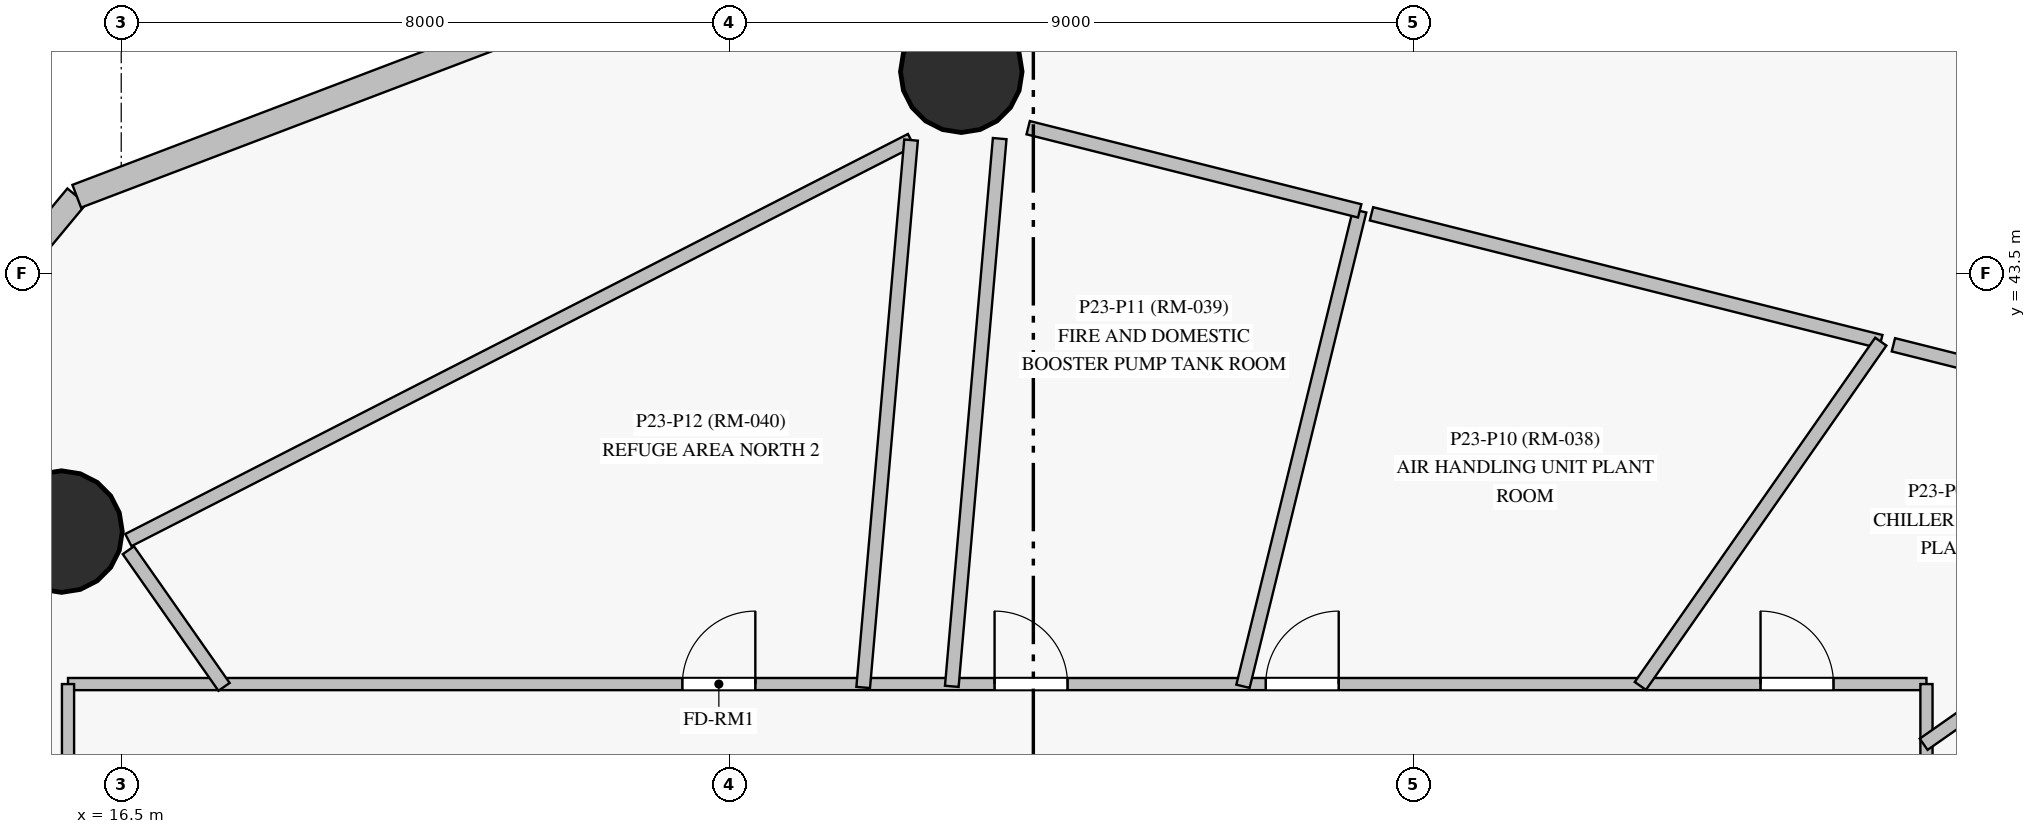
"""IFC4 building model, lengths in metres.
Left out: names, types, materials, properties, quantities, classifications, styles, units other than length and angle.
Written with IfcOpenShell. Run it as: python <this file> out.ifc"""

import sys

from ifc_helpers import new_model, si_unit, direction, frame, frame_2d, origin, origin_with_axes, origin_2d, place, context, subcontext, project, spatial, rectangle, circle, extrude, source, transform, mapped, element, fill, save


model = new_model("IFC4")
c1 = context("Model", 3, precision=1e-05, world=origin(), true_north=direction((0.0, 1.0)))
c2 = subcontext(c1, "Body", "Model", "MODEL_VIEW")
j1 = project(units=[si_unit("LENGTHUNIT", "METRE"), si_unit("PLANEANGLEUNIT", "RADIAN")], contexts=[c1])
p1 = place(None, origin())
s1 = spatial("IfcSite", under=j1, at=p1, CompositionType="ELEMENT")
p2 = place(p1, origin())
s2 = spatial("IfcBuilding", under=s1, at=p2, CompositionType="ELEMENT")
p3 = place(p2, frame((0.0, 0.0, 87.7)))
s3 = spatial("IfcBuildingStorey", under=s2, at=p3, CompositionType="ELEMENT", Elevation=87.7)
m1 = source(origin_with_axes(), c2, "Body", "SweptSolid", [
    extrude(circle(Radius=0.8, at=origin_2d()), origin(), (0.0, 0.0, 1.0), 4.5),
])
for number, where, z_axis, x_axis in (
    (1, (27.552, 46.156, 0.0), (0.0, 0.0, 1.0), (1.0, 0.0, 0.0)),
    (2, (15.714, 40.106, 0.0), (0.0, 0.0, 1.0), (1.0, 0.0, 0.0)),
):
    element("IfcColumn", number, at=place(p3, frame(where, z_axis=z_axis, x_axis=x_axis)), inside=s3, PredefinedType="COLUMN", context=c2, shape_type="MappedRepresentation", body=[
        mapped(m1, transform((0.0, 0.0, 0.0), scale=1.0)),
    ])
p4 = place(p3, frame((15.915, 44.518, 0.0), z_axis=(0.0, 0.0, 1.0), x_axis=(-0.638496499315, -0.76962472697, 0.0)))
e3 = element("IfcWall", 3, at=p4, inside=s3, PredefinedType="SOLIDWALL", context=c2, shape_type="SweptSolid", body=[
    extrude(rectangle(XDim=11.663, YDim=0.32, at=frame_2d((5.831, 0.0))), origin(), (0.0, 0.0, 1.0), 4.275),
])
p5 = place(p3, frame((49.929, 42.108, 0.0), z_axis=(0.0, 0.0, 1.0), x_axis=(-0.834787406888, 0.550572416038, 0.0)))
e4 = element("IfcWall", 4, at=p5, inside=s3, PredefinedType="SOLIDWALL", context=c2, shape_type="SweptSolid", body=[
    extrude(rectangle(XDim=12.482, YDim=0.32, at=frame_2d((6.241, 0.0))), origin(), (0.0, 0.0, 1.0), 4.275),
])
p6 = place(p3, frame((29.502, 49.689, 0.0), z_axis=(0.0, 0.0, 1.0), x_axis=(-0.934598887082, -0.355703416156, 0.0)))
e5 = element("IfcWall", 5, at=p6, inside=s3, PredefinedType="SOLIDWALL", context=c2, shape_type="SweptSolid", body=[
    extrude(rectangle(XDim=14.539, YDim=0.32, at=frame_2d((7.269, 0.0))), origin(), (0.0, 0.0, 1.0), 3.945),
])
p7 = place(p3, frame((15.8, 38.1, 0.0), z_axis=(0.0, 0.0, 1.0), x_axis=(1.0, 0.0, 0.0)))
e6 = element("IfcWall", 6, at=p7, inside=s3, PredefinedType="PARTITIONING", context=c2, shape_type="SweptSolid", body=[
    extrude(rectangle(XDim=24.45, YDim=0.16, at=frame_2d((12.225, 0.0))), origin(), (0.0, 0.0, 1.0), 2.875),
])
p8 = place(p7, frame((8.083, 0.0, 0.0)))
e7 = element("IfcOpeningElement", 7, at=p8, cuts=e6, PredefinedType="OPENING", context=c2, shape_type="SweptSolid", body=[
    extrude(rectangle(XDim=0.96, YDim=2.15, at=frame_2d((0.48, 1.075))), frame((0.0, 0.09, 0.0), z_axis=(0.0, -1.0, 0.0), x_axis=(1.0, 0.0, 0.0)), (0.0, 0.0, 1.0), 0.18),
])
p9 = place(p7, frame((22.267, 0.0, 0.0)))
e8 = element("IfcOpeningElement", 8, at=p9, cuts=e6, PredefinedType="OPENING", context=c2, shape_type="SweptSolid", body=[
    extrude(rectangle(XDim=0.96, YDim=2.15, at=frame_2d((0.48, 1.075))), frame((0.0, 0.09, 0.0), z_axis=(0.0, -1.0, 0.0), x_axis=(1.0, 0.0, 0.0)), (0.0, 0.0, 1.0), 0.18),
])
p10 = place(p7, frame((15.758, 0.0, 0.0)))
e9 = element("IfcOpeningElement", 9, at=p10, cuts=e6, PredefinedType="OPENING", context=c2, shape_type="SweptSolid", body=[
    extrude(rectangle(XDim=0.96, YDim=2.15, at=frame_2d((0.48, 1.075))), frame((0.0, 0.09, 0.0), z_axis=(0.0, -1.0, 0.0), x_axis=(1.0, 0.0, 0.0)), (0.0, 0.0, 1.0), 0.18),
])
p11 = place(p7, frame((12.19, 0.0, 0.0)))
e10 = element("IfcOpeningElement", 10, at=p11, cuts=e6, PredefinedType="OPENING", context=c2, shape_type="SweptSolid", body=[
    extrude(rectangle(XDim=0.96, YDim=2.15, at=frame_2d((0.48, 1.075))), frame((0.0, 0.09, 0.0), z_axis=(0.0, -1.0, 0.0), x_axis=(1.0, 0.0, 0.0)), (0.0, 0.0, 1.0), 0.18),
])
p12 = place(p3, frame((40.25, 38.1, 0.0), z_axis=(0.0, 0.0, 1.0), x_axis=(0.0, -1.0, 0.0)))
e11 = element("IfcWall", 11, at=p12, inside=s3, PredefinedType="PARTITIONING", context=c2, shape_type="SweptSolid", body=[
    extrude(rectangle(XDim=23.0, YDim=0.16, at=frame_2d((11.5, 0.0))), origin(), (0.0, 0.0, 1.0), 2.875),
])
p13 = place(p12, frame((11.025, 0.0, 0.0)))
e12 = element("IfcOpeningElement", 12, at=p13, cuts=e11, PredefinedType="OPENING", context=c2, shape_type="SweptSolid", body=[
    extrude(rectangle(XDim=0.96, YDim=2.15, at=frame_2d((0.48, 1.075))), frame((0.0, 0.09, 0.0), z_axis=(0.0, -1.0, 0.0), x_axis=(1.0, 0.0, 0.0)), (0.0, 0.0, 1.0), 0.18),
])
p14 = place(p12, frame((7.575, 0.0, 0.0)))
e13 = element("IfcOpeningElement", 13, at=p14, cuts=e11, PredefinedType="OPENING", context=c2, shape_type="SweptSolid", body=[
    extrude(rectangle(XDim=0.96, YDim=2.15, at=frame_2d((0.48, 1.075))), frame((0.0, 0.09, 0.0), z_axis=(0.0, -1.0, 0.0), x_axis=(1.0, 0.0, 0.0)), (0.0, 0.0, 1.0), 0.18),
])
p15 = place(p12, frame((5.235, 0.0, 0.0)))
e14 = element("IfcOpeningElement", 14, at=p15, cuts=e11, PredefinedType="OPENING", context=c2, shape_type="SweptSolid", body=[
    extrude(rectangle(XDim=0.96, YDim=2.15, at=frame_2d((0.48, 1.075))), frame((0.0, 0.09, 0.0), z_axis=(0.0, -1.0, 0.0), x_axis=(1.0, 0.0, 0.0)), (0.0, 0.0, 1.0), 0.18),
])
p16 = place(p3, frame((16.594, 39.994, 0.0), z_axis=(0.0, 0.0, 1.0), x_axis=(0.890452933606, 0.455075348742, 0.0)))
e15 = element("IfcWall", 15, at=p16, inside=s3, PredefinedType="PARTITIONING", context=c2, shape_type="SweptSolid", body=[
    extrude(rectangle(XDim=11.564, YDim=0.18, at=frame_2d((5.782, 0.0))), origin(), (0.0, 0.0, 1.0), 2.875),
])
p17 = place(p3, frame((40.225, 35.9, 0.0), z_axis=(0.0, 0.0, 1.0), x_axis=(0.819160824873, 0.573563896173, 0.0)))
e16 = element("IfcWall", 16, at=p17, inside=s3, PredefinedType="PARTITIONING", context=c2, shape_type="SweptSolid", body=[
    extrude(rectangle(XDim=7.422, YDim=0.18, at=frame_2d((3.711, 0.0))), origin(), (0.0, 0.0, 1.0), 2.775),
])
p18 = place(p3, frame((27.427, 38.07, 0.0), z_axis=(0.0, 0.0, 1.0), x_axis=(0.087114612943, 0.996198295628, 0.0)))
e17 = element("IfcWall", 17, at=p18, inside=s3, PredefinedType="PARTITIONING", context=c2, shape_type="SweptSolid", body=[
    extrude(rectangle(XDim=7.233, YDim=0.18, at=frame_2d((3.617, 0.0))), origin(), (0.0, 0.0, 1.0), 2.775),
])
p19 = place(p3, frame((26.891, 45.257, 0.0), z_axis=(0.0, 0.0, 1.0), x_axis=(-0.087133852983, -0.996196612956, 0.0)))
e18 = element("IfcWall", 18, at=p19, inside=s3, PredefinedType="PARTITIONING", context=c2, shape_type="SweptSolid", body=[
    extrude(rectangle(XDim=7.229, YDim=0.18, at=frame_2d((3.615, 0.0))), origin(), (0.0, 0.0, 1.0), 2.775),
])
p20 = place(p3, frame((32.948, 44.286, 0.0), z_axis=(0.0, 0.0, 1.0), x_axis=(0.969930091921, -0.243383682251, 0.0)))
e19 = element("IfcWall", 19, at=p20, inside=s3, PredefinedType="PARTITIONING", context=c2, shape_type="SweptSolid", body=[
    extrude(rectangle(XDim=6.908, YDim=0.18, at=frame_2d((3.454, 0.0))), origin(), (0.0, 0.0, 1.0), 2.875),
])
p21 = place(p3, frame((45.634, 41.103, 0.0), z_axis=(0.0, 0.0, 1.0), x_axis=(-0.819152178868, -0.573576244153, 0.0)))
e20 = element("IfcWall", 20, at=p21, inside=s3, PredefinedType="PARTITIONING", context=c2, shape_type="SweptSolid", body=[
    extrude(rectangle(XDim=6.617, YDim=0.18, at=frame_2d((3.309, 0.0))), origin(), (0.0, 0.0, 1.0), 2.775),
])
p22 = place(p3, frame((32.793, 44.325, 0.0), z_axis=(0.0, 0.0, 1.0), x_axis=(-0.238376702806, -0.971172769161, 0.0)))
e21 = element("IfcWall", 21, at=p22, inside=s3, PredefinedType="PARTITIONING", context=c2, shape_type="SweptSolid", body=[
    extrude(rectangle(XDim=6.44, YDim=0.18, at=frame_2d((3.22, 0.0))), origin(), (0.0, 0.0, 1.0), 4.275),
])
p23 = place(p3, frame((39.815, 42.563, 0.0), z_axis=(0.0, 0.0, 1.0), x_axis=(0.969931458511, -0.243378236065, 0.0)))
e22 = element("IfcWall", 22, at=p23, inside=s3, PredefinedType="PARTITIONING", context=c2, shape_type="SweptSolid", body=[
    extrude(rectangle(XDim=5.999, YDim=0.18, at=frame_2d((3.0, 0.0))), origin(), (0.0, 0.0, 1.0), 3.375),
])
p24 = place(p3, frame((39.649, 42.605, 0.0), z_axis=(0.0, 0.0, 1.0), x_axis=(-0.572539603356, -0.819877065534, 0.0)))
e23 = element("IfcWall", 23, at=p24, inside=s3, PredefinedType="PARTITIONING", context=c2, shape_type="SweptSolid", body=[
    extrude(rectangle(XDim=5.525, YDim=0.18, at=frame_2d((2.762, 0.0))), origin(), (0.0, 0.0, 1.0), 4.275),
])
p25 = place(p3, frame((28.432, 45.42, 0.0), z_axis=(0.0, 0.0, 1.0), x_axis=(0.969924931408, -0.243404246949, 0.0)))
e24 = element("IfcWall", 24, at=p25, inside=s3, PredefinedType="PARTITIONING", context=c2, shape_type="SweptSolid", body=[
    extrude(rectangle(XDim=4.497, YDim=0.18, at=frame_2d((2.248, 0.0))), origin(), (0.0, 0.0, 1.0), 2.875),
])
p26 = place(p3, frame((15.8, 34.7, 0.0), z_axis=(0.0, 0.0, 1.0), x_axis=(0.0, 1.0, 0.0)))
e25 = element("IfcWall", 25, at=p26, inside=s3, PredefinedType="PARTITIONING", context=c2, shape_type="SweptSolid", body=[
    extrude(rectangle(XDim=3.4, YDim=0.16, at=frame_2d((1.7, 0.0))), origin(), (0.0, 0.0, 1.0), 2.875),
])
p27 = place(p3, frame((17.853, 38.063, 0.0), z_axis=(0.0, 0.0, 1.0), x_axis=(-0.573604197983, 0.819132604684, 0.0)))
e26 = element("IfcWall", 26, at=p27, inside=s3, PredefinedType="PARTITIONING", context=c2, shape_type="SweptSolid", body=[
    extrude(rectangle(XDim=2.195, YDim=0.18, at=frame_2d((1.097, 0.0))), origin(), (0.0, 0.0, 1.0), 2.775),
])
m2 = source(origin_with_axes(), c2, "Body", "SweptSolid", [
    extrude(rectangle(XDim=0.96, YDim=2.15, at=frame_2d((0.48, 1.075))), frame((0.0, 0.025, 0.0), z_axis=(0.0, -1.0, 0.0), x_axis=(1.0, 0.0, 0.0)), (0.0, 0.0, 1.0), 0.05),
])
p28 = place(p8, origin())
e27 = element("IfcDoor", 27, at=p28, inside=s3, OperationType="SINGLE_SWING_RIGHT", PredefinedType="DOOR", context=c2, shape_type="MappedRepresentation", body=[
    mapped(m2, transform((0.0, 0.0, 0.0), scale=1.0)),
])
fill(e7, e27)
p29 = place(p9, origin())
e28 = element("IfcDoor", 28, at=p29, inside=s3, OperationType="SINGLE_SWING_LEFT", PredefinedType="DOOR", context=c2, shape_type="MappedRepresentation", body=[
    mapped(m2, transform((0.0, 0.0, 0.0), scale=1.0)),
])
fill(e8, e28)
p30 = place(p10, origin())
e29 = element("IfcDoor", 29, at=p30, inside=s3, OperationType="SINGLE_SWING_RIGHT", PredefinedType="DOOR", context=c2, shape_type="MappedRepresentation", body=[
    mapped(m2, transform((0.0, 0.0, 0.0), scale=1.0)),
])
fill(e9, e29)
p31 = place(p11, origin())
e30 = element("IfcDoor", 30, at=p31, inside=s3, OperationType="SINGLE_SWING_LEFT", PredefinedType="DOOR", context=c2, shape_type="MappedRepresentation", body=[
    mapped(m2, transform((0.0, 0.0, 0.0), scale=1.0)),
])
fill(e10, e30)
save(model, sys.argv[1])
